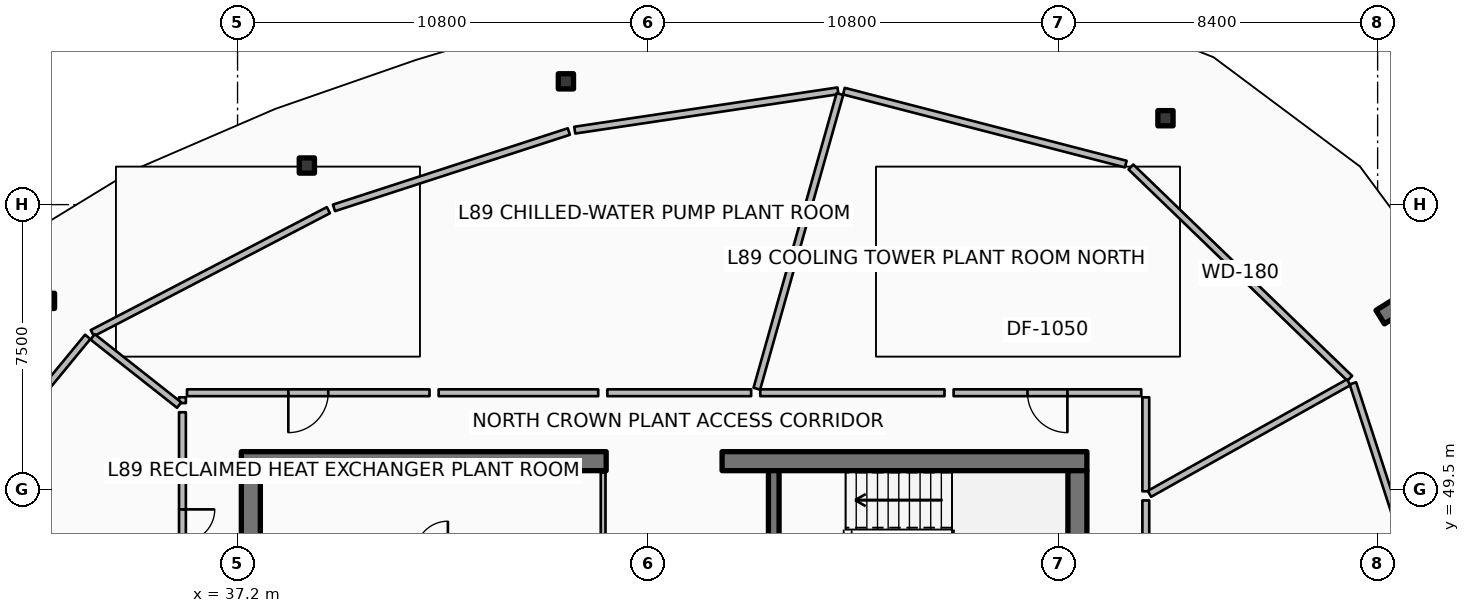
"""IFC4 building model, lengths in metres.
Left out: names, types, materials, properties, quantities, classifications, styles, units other than length and angle.
Written with IfcOpenShell. Run it as: python <this file> out.ifc"""

import sys

from ifc_helpers import new_model, si_unit, direction, frame, frame_2d, origin, origin_2d, place, context, subcontext, project, spatial, rectangle, hollow_rectangle, extrude, element, fill, save


model = new_model("IFC4")
c1 = context("Model", 3, precision=1e-05, world=origin(), true_north=direction((0.0, 1.0)))
c2 = subcontext(c1, "Body", "Model", "MODEL_VIEW")
j1 = project(units=[si_unit("LENGTHUNIT", "METRE"), si_unit("PLANEANGLEUNIT", "RADIAN")], contexts=[c1])
p1 = place(None, origin())
s1 = spatial("IfcSite", under=j1, at=p1, CompositionType="ELEMENT")
p2 = place(p1, origin())
s2 = spatial("IfcBuilding", under=s1, at=p2, CompositionType="ELEMENT")
p3 = place(p2, frame((0.0, 0.0, 356.0)))
s3 = spatial("IfcBuildingStorey", under=s2, at=p3, CompositionType="ELEMENT", Elevation=356.0)
p4 = place(p3, frame((37.3, 50.25, 0.0), z_axis=(0.0, 0.0, 1.0), x_axis=(1.0, 0.0, 0.0)))
e1 = element("IfcWall", 1, at=p4, inside=s3, PredefinedType="SHEAR", context=c2, shape_type="SweptSolid", body=[
    extrude(rectangle(XDim=9.6, YDim=0.5, at=frame_2d((4.8, 0.0))), origin(), (0.0, 0.0, 1.0), 3.6),
])
p5 = place(p3, frame((49.95, 50.25, 0.0), z_axis=(0.0, 0.0, 1.0), x_axis=(1.0, 0.0, 0.0)))
e2 = element("IfcWall", 2, at=p5, inside=s3, PredefinedType="SHEAR", context=c2, shape_type="SweptSolid", body=[
    extrude(rectangle(XDim=9.6, YDim=0.5, at=frame_2d((4.8, 0.0))), origin(), (0.0, 0.0, 1.0), 3.6),
])
for number, where, z_axis, x_axis in (
    (3, (37.55, 34.0, 0.0), (0.0, 0.0, 1.0), (0.0, 1.0, 0.0)),
    (4, (59.3, 34.0, 0.0), (0.0, 0.0, 1.0), (0.0, 1.0, 0.0)),
):
    element("IfcWall", number, at=place(p3, frame(where, z_axis=z_axis, x_axis=x_axis)), inside=s3, PredefinedType="SHEAR", context=c2, shape_type="SweptSolid", body=[
        extrude(rectangle(XDim=16.0, YDim=0.5, at=frame_2d((8.0, 0.0))), origin(), (0.0, 0.0, 1.0), 3.6),
    ])
p6 = place(p3, frame((51.31, 46.5, 0.0), z_axis=(0.0, 0.0, 1.0), x_axis=(0.0, 1.0, 0.0)))
e5 = element("IfcWall", 5, at=p6, inside=s3, PredefinedType="SHEAR", context=c2, shape_type="SweptSolid", body=[
    extrude(rectangle(XDim=3.5, YDim=0.28, at=frame_2d((1.75, 0.0))), origin(), (0.0, 0.0, 1.0), 3.6),
])
p7 = place(p3, frame((67.269, 54.041, 0.0), z_axis=(0.0, 0.0, 1.0), x_axis=(0.848033572426, 0.529942506352, 0.0)))
e6 = element("IfcWall", 6, at=p7, inside=s3, PredefinedType="SOLIDWALL", context=c2, shape_type="SweptSolid", body=[
    extrude(rectangle(XDim=3.5, YDim=0.42, at=frame_2d((1.75, 0.0))), origin(), (0.0, 0.0, 1.0), 3.6),
])
for number, where, z_axis, x_axis in (
    (7, (61.617, 59.274, 0.0), (0.0, 0.0, 1.0), (1.0, 0.0, 0.0)),
    (8, (45.841, 60.244, 0.0), (0.0, 0.0, 1.0), (1.0, 0.0, 0.0)),
    (9, (39.023, 58.029, 0.0), (0.0, 0.0, 1.0), (1.0, 0.0, 0.0)),
    (10, (32.185, 54.468, 0.0), (0.0, 0.0, 1.0), (1.0, 0.0, 0.0)),
):
    element("IfcColumn", number, at=place(p3, frame(where, z_axis=z_axis, x_axis=x_axis)), inside=s3, PredefinedType="COLUMN", context=c2, shape_type="SweptSolid", body=[
        extrude(hollow_rectangle(XDim=0.4, YDim=0.4, WallThickness=0.02, InnerFilletRadius=0.02, OuterFilletRadius=0.04, at=origin_2d()), origin(), (0.0, 0.0, 1.0), 3.32),
    ])
p8 = place(p3, frame((46.82, 47.92, 0.0), z_axis=(0.0, 0.0, 1.0), x_axis=(0.0, 1.0, 0.0)))
e11 = element("IfcWall", 11, at=p8, inside=s3, PredefinedType="PARTITIONING", context=c2, shape_type="SweptSolid", body=[
    extrude(rectangle(XDim=2.03, YDim=0.125, at=frame_2d((1.015, 0.0))), origin(), (0.0, 0.0, 1.0), 2.76),
])
p9 = place(p3, frame((66.467, 52.43, 0.0), z_axis=(0.0, 0.0, 1.0), x_axis=(-0.719364153135, 0.694633151516, 0.0)))
e12 = element("IfcWall", 12, at=p9, inside=s3, PredefinedType="PARTITIONING", context=c2, shape_type="SweptSolid", body=[
    extrude(rectangle(XDim=8.006, YDim=0.18, at=frame_2d((4.003, 0.0))), origin(), (0.0, 0.0, 1.0), 2.76),
])
p10 = place(p3, frame((60.573, 58.066, 0.0), z_axis=(0.0, 0.0, 1.0), x_axis=(-0.968117205342, 0.250497658115, 0.0)))
e13 = element("IfcWall", 13, at=p10, inside=s3, PredefinedType="PARTITIONING", context=c2, shape_type="SweptSolid", body=[
    extrude(rectangle(XDim=7.662, YDim=0.18, at=frame_2d((3.831, 0.0))), origin(), (0.0, 0.0, 1.0), 2.76),
])
p11 = place(p3, frame((52.999, 59.994, 0.0), z_axis=(0.0, 0.0, 1.0), x_axis=(-0.989034336252, -0.147685753256, 0.0)))
e14 = element("IfcWall", 14, at=p11, inside=s3, PredefinedType="PARTITIONING", context=c2, shape_type="SweptSolid", body=[
    extrude(rectangle(XDim=7.003, YDim=0.18, at=frame_2d((3.501, 0.0))), origin(), (0.0, 0.0, 1.0), 2.76),
])
p12 = place(p3, frame((45.918, 58.923, 0.0), z_axis=(0.0, 0.0, 1.0), x_axis=(-0.95105283999, -0.309028308649, 0.0)))
e15 = element("IfcWall", 15, at=p12, inside=s3, PredefinedType="PARTITIONING", context=c2, shape_type="SweptSolid", body=[
    extrude(rectangle(XDim=6.499, YDim=0.18, at=frame_2d((3.25, 0.0))), origin(), (0.0, 0.0, 1.0), 2.76),
])
p13 = place(p3, frame((39.59, 56.853, 0.0), z_axis=(0.0, 0.0, 1.0), x_axis=(-0.886949494865, -0.461866423935, 0.0)))
e16 = element("IfcWall", 16, at=p13, inside=s3, PredefinedType="PARTITIONING", context=c2, shape_type="SweptSolid", body=[
    extrude(rectangle(XDim=7.002, YDim=0.18, at=frame_2d((3.501, 0.0))), origin(), (0.0, 0.0, 1.0), 2.76),
])
p14 = place(p3, frame((33.258, 53.52, 0.0), z_axis=(0.0, 0.0, 1.0), x_axis=(-0.636018833443, -0.771673534278, 0.0)))
e17 = element("IfcWall", 17, at=p14, inside=s3, PredefinedType="PARTITIONING", context=c2, shape_type="SweptSolid", body=[
    extrude(rectangle(XDim=7.661, YDim=0.18, at=frame_2d((3.831, 0.0))), origin(), (0.0, 0.0, 1.0), 2.76),
])
p15 = place(p3, frame((69.059, 44.572, 0.0), z_axis=(0.0, 0.0, 1.0), x_axis=(-0.309024234991, 0.951054163646, 0.0)))
e18 = element("IfcWall", 18, at=p15, inside=s3, PredefinedType="PARTITIONING", context=c2, shape_type="SweptSolid", body=[
    extrude(rectangle(XDim=8.124, YDim=0.18, at=frame_2d((4.062, 0.0))), origin(), (0.0, 0.0, 1.0), 2.76),
])
p16 = place(p3, frame((61.1, 49.456, 0.0), z_axis=(0.0, 0.0, 1.0), x_axis=(0.0, 1.0, 0.0)))
e19 = element("IfcWall", 19, at=p16, inside=s3, PredefinedType="PARTITIONING", context=c2, shape_type="SweptSolid", body=[
    extrude(rectangle(XDim=2.474, YDim=0.18, at=frame_2d((1.237, 0.0))), origin(), (0.0, 0.0, 1.0), 2.76),
])
p17 = place(p3, frame((60.98, 52.05, 0.0), z_axis=(0.0, 0.0, 1.0), x_axis=(-1.0, 0.0, 0.0)))
e20 = element("IfcWall", 20, at=p17, inside=s3, PredefinedType="PARTITIONING", context=c2, shape_type="SweptSolid", body=[
    extrude(rectangle(XDim=4.937, YDim=0.18, at=frame_2d((2.469, 0.0))), origin(), (0.0, 0.0, 1.0), 2.76),
])
p18 = place(p17, frame((1.944, 0.0, 0.0)))
e21 = element("IfcOpeningElement", 21, at=p18, cuts=e20, PredefinedType="OPENING", context=c2, shape_type="SweptSolid", body=[
    extrude(rectangle(XDim=1.05, YDim=2.1, at=frame_2d((0.525, 1.05))), frame((0.0, 0.1, 0.0), z_axis=(0.0, -1.0, 0.0), x_axis=(1.0, 0.0, 0.0)), (0.0, 0.0, 1.0), 0.2),
])
p19 = place(p3, frame((55.803, 52.05, 0.0), z_axis=(0.0, 0.0, 1.0), x_axis=(-1.0, 0.0, 0.0)))
e22 = element("IfcWall", 22, at=p19, inside=s3, PredefinedType="PARTITIONING", context=c2, shape_type="SweptSolid", body=[
    extrude(rectangle(XDim=4.848, YDim=0.18, at=frame_2d((2.424, 0.0))), origin(), (0.0, 0.0, 1.0), 2.76),
])
p20 = place(p3, frame((61.196, 49.39, 0.0), z_axis=(0.0, 0.0, 1.0), x_axis=(0.87249769897, 0.488618220385, 0.0)))
e23 = element("IfcWall", 23, at=p20, inside=s3, PredefinedType="PARTITIONING", context=c2, shape_type="SweptSolid", body=[
    extrude(rectangle(XDim=6.007, YDim=0.18, at=frame_2d((3.003, 0.0))), origin(), (0.0, 0.0, 1.0), 2.76),
])
p21 = place(p3, frame((50.864, 52.156, 0.0), z_axis=(0.0, 0.0, 1.0), x_axis=(0.271457285698, 0.962450488099, 0.0)))
e24 = element("IfcWall", 24, at=p21, inside=s3, PredefinedType="PARTITIONING", context=c2, shape_type="SweptSolid", body=[
    extrude(rectangle(XDim=8.056, YDim=0.18, at=frame_2d((4.028, 0.0))), origin(), (0.0, 0.0, 1.0), 2.76),
])
p22 = place(p3, frame((50.714, 52.05, 0.0), z_axis=(0.0, 0.0, 1.0), x_axis=(-1.0, 0.0, 0.0)))
e25 = element("IfcWall", 25, at=p22, inside=s3, PredefinedType="PARTITIONING", context=c2, shape_type="SweptSolid", body=[
    extrude(rectangle(XDim=3.784, YDim=0.18, at=frame_2d((1.892, 0.0))), origin(), (0.0, 0.0, 1.0), 2.76),
])
p23 = place(p3, frame((46.69, 52.05, 0.0), z_axis=(0.0, 0.0, 1.0), x_axis=(-1.0, 0.0, 0.0)))
e26 = element("IfcWall", 26, at=p23, inside=s3, PredefinedType="PARTITIONING", context=c2, shape_type="SweptSolid", body=[
    extrude(rectangle(XDim=4.199, YDim=0.18, at=frame_2d((2.099, 0.0))), origin(), (0.0, 0.0, 1.0), 2.76),
])
p24 = place(p3, frame((42.252, 52.05, 0.0), z_axis=(0.0, 0.0, 1.0), x_axis=(-1.0, 0.0, 0.0)))
e27 = element("IfcWall", 27, at=p24, inside=s3, PredefinedType="PARTITIONING", context=c2, shape_type="SweptSolid", body=[
    extrude(rectangle(XDim=6.382, YDim=0.18, at=frame_2d((3.191, 0.0))), origin(), (0.0, 0.0, 1.0), 2.76),
])
p25 = place(p24, frame((2.666, 0.0, 0.0)))
e28 = element("IfcOpeningElement", 28, at=p25, cuts=e27, PredefinedType="OPENING", context=c2, shape_type="SweptSolid", body=[
    extrude(rectangle(XDim=1.05, YDim=2.1, at=frame_2d((0.525, 1.05))), frame((0.0, 0.1, 0.0), z_axis=(0.0, -1.0, 0.0), x_axis=(1.0, 0.0, 0.0)), (0.0, 0.0, 1.0), 0.2),
])
p26 = place(p3, frame((35.75, 51.93, 0.0), z_axis=(0.0, 0.0, 1.0), x_axis=(0.0, -1.0, 0.0)))
e29 = element("IfcWall", 29, at=p26, inside=s3, PredefinedType="PARTITIONING", context=c2, shape_type="SweptSolid", body=[
    extrude(rectangle(XDim=0.153, YDim=0.18, at=frame_2d((0.076, 0.0))), origin(), (0.0, 0.0, 1.0), 2.76),
])
p27 = place(p3, frame((35.664, 51.725, 0.0), z_axis=(0.0, 0.0, 1.0), x_axis=(-0.78528570066, 0.619133562601, 0.0)))
e30 = element("IfcWall", 30, at=p27, inside=s3, PredefinedType="PARTITIONING", context=c2, shape_type="SweptSolid", body=[
    extrude(rectangle(XDim=2.899, YDim=0.18, at=frame_2d((1.45, 0.0))), origin(), (0.0, 0.0, 1.0), 2.76),
])
p28 = place(p3, frame((35.75, 51.537, 0.0), z_axis=(0.0, 0.0, 1.0), x_axis=(0.0, -1.0, 0.0)))
e31 = element("IfcWall", 31, at=p28, inside=s3, PredefinedType="PARTITIONING", context=c2, shape_type="SweptSolid", body=[
    extrude(rectangle(XDim=5.962, YDim=0.18, at=frame_2d((2.981, 0.0))), origin(), (0.0, 0.0, 1.0), 2.76),
])
p29 = place(p28, frame((2.556, 0.0, 0.0)))
e32 = element("IfcOpeningElement", 32, at=p29, cuts=e31, PredefinedType="OPENING", context=c2, shape_type="SweptSolid", body=[
    extrude(rectangle(XDim=0.85, YDim=2.06, at=frame_2d((0.425, 1.03))), frame((0.0, 0.1, 0.0), z_axis=(0.0, -1.0, 0.0), x_axis=(1.0, 0.0, 0.0)), (0.0, 0.0, 1.0), 0.2),
])
p30 = place(p3, frame((61.1, 43.67, 0.0), z_axis=(0.0, 0.0, 1.0), x_axis=(0.0, 1.0, 0.0)))
e33 = element("IfcWall", 33, at=p30, inside=s3, PredefinedType="PARTITIONING", context=c2, shape_type="SweptSolid", body=[
    extrude(rectangle(XDim=5.546, YDim=0.18, at=frame_2d((2.773, 0.0))), origin(), (0.0, 0.0, 1.0), 2.76),
])
p31 = place(p30, frame((2.348, 0.0, 0.0)))
e34 = element("IfcOpeningElement", 34, at=p31, cuts=e33, PredefinedType="OPENING", context=c2, shape_type="SweptSolid", body=[
    extrude(rectangle(XDim=0.85, YDim=2.06, at=frame_2d((0.425, 1.03))), frame((0.0, 0.1, 0.0), z_axis=(0.0, -1.0, 0.0), x_axis=(1.0, 0.0, 0.0)), (0.0, 0.0, 1.0), 0.2),
])
p32 = place(p18, origin())
e35 = element("IfcDoor", 35, at=p32, inside=s3, OperationType="SINGLE_SWING_LEFT", PredefinedType="DOOR", context=c2, shape_type="SweptSolid", body=[
    extrude(rectangle(XDim=1.05, YDim=2.1, at=frame_2d((0.525, 1.05))), frame((0.0, 0.025, 0.0), z_axis=(0.0, -1.0, 0.0), x_axis=(1.0, 0.0, 0.0)), (0.0, 0.0, 1.0), 0.05),
])
fill(e21, e35)
p33 = place(p25, origin())
e36 = element("IfcDoor", 36, at=p33, inside=s3, OperationType="SINGLE_SWING_RIGHT", PredefinedType="DOOR", context=c2, shape_type="SweptSolid", body=[
    extrude(rectangle(XDim=1.05, YDim=2.1, at=frame_2d((0.525, 1.05))), frame((0.0, 0.025, 0.0), z_axis=(0.0, -1.0, 0.0), x_axis=(1.0, 0.0, 0.0)), (0.0, 0.0, 1.0), 0.05),
])
fill(e28, e36)
p34 = place(p29, origin())
e37 = element("IfcDoor", 37, at=p34, inside=s3, OperationType="SINGLE_SWING_LEFT", PredefinedType="DOOR", context=c2, shape_type="SweptSolid", body=[
    extrude(rectangle(XDim=0.85, YDim=2.06, at=frame_2d((0.425, 1.03))), frame((0.0, 0.025, 0.0), z_axis=(0.0, -1.0, 0.0), x_axis=(1.0, 0.0, 0.0)), (0.0, 0.0, 1.0), 0.05),
])
fill(e32, e37)
save(model, sys.argv[1])
